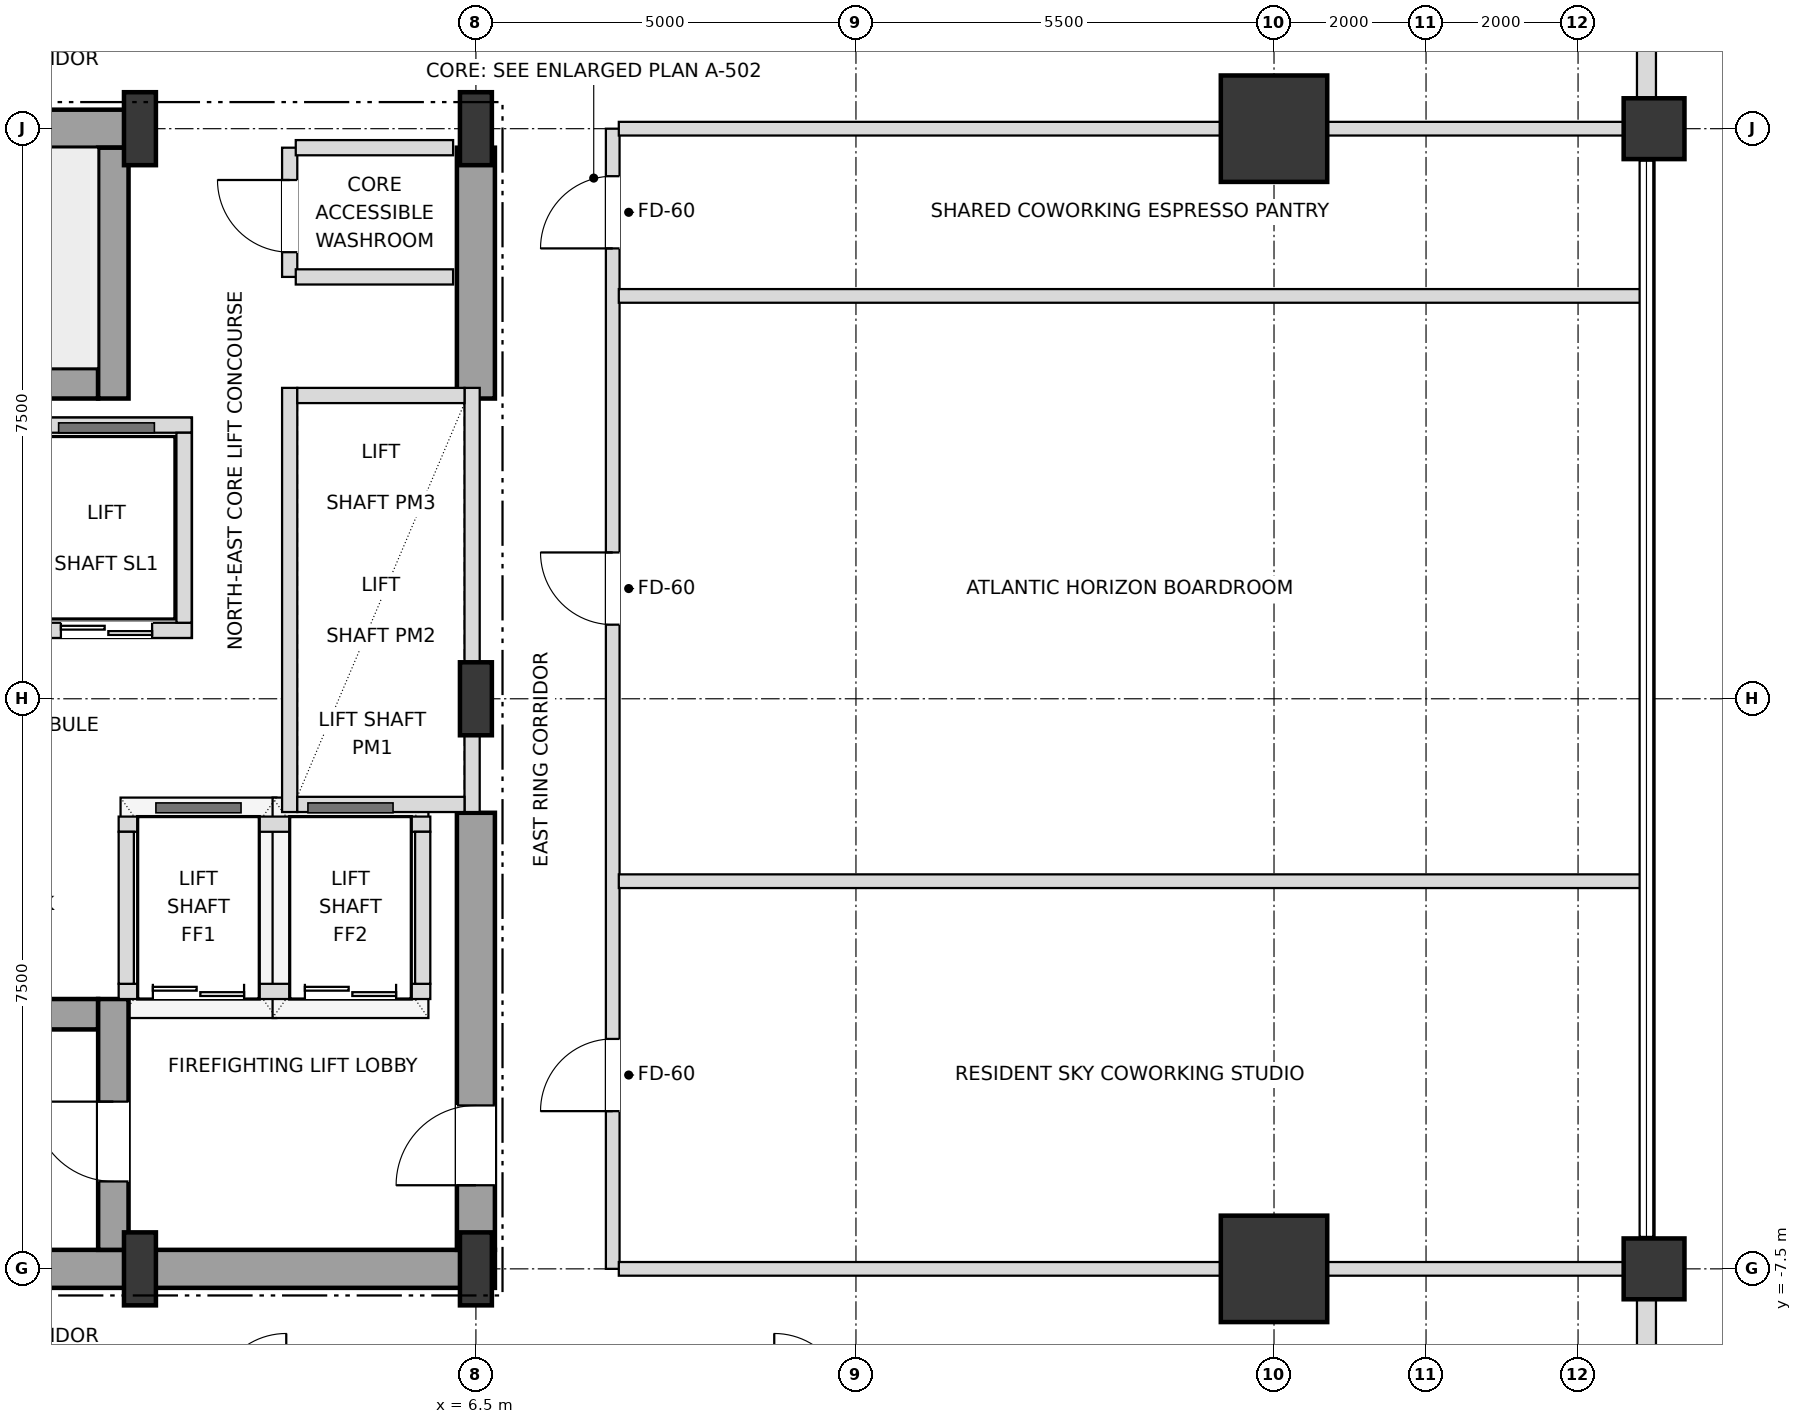
"""IFC4 building model, lengths in metres.
Left out: names, types, materials, properties, quantities, classifications, styles, units other than length and angle.
Written with IfcOpenShell. Run it as: python <this file> out.ifc"""

import sys

from ifc_helpers import new_model, si_unit, direction, frame, frame_2d, origin, origin_2d, place, context, subcontext, project, spatial, rectangle, i_section, extrude, element, fill, save


model = new_model("IFC4")
c1 = context("Model", 3, precision=1e-05, world=origin(), true_north=direction((0.0, 1.0)))
c2 = subcontext(c1, "Body", "Model", "MODEL_VIEW")
j1 = project(units=[si_unit("LENGTHUNIT", "METRE"), si_unit("PLANEANGLEUNIT", "RADIAN")], contexts=[c1])
p1 = place(None, origin())
s1 = spatial("IfcSite", under=j1, at=p1, CompositionType="ELEMENT")
p2 = place(p1, origin())
s2 = spatial("IfcBuilding", under=s1, at=p2, CompositionType="ELEMENT")
p3 = place(p2, frame((0.0, 0.0, 86.4)))
s3 = spatial("IfcBuildingStorey", under=s2, at=p3, CompositionType="ELEMENT", Elevation=86.4)
for number, where, z_axis, x_axis in (
    (1, (2.08, -7.5, 0.0), (0.0, 0.0, 1.0), (1.0, 0.0, 0.0)),
    (2, (6.5, -7.5, 0.0), (0.0, 0.0, 1.0), (1.0, 0.0, 0.0)),
    (3, (6.5, 0.0, 0.0), (0.0, 0.0, 1.0), (1.0, 0.0, 0.0)),
    (4, (2.08, 7.5, 0.0), (0.0, 0.0, 1.0), (1.0, 0.0, 0.0)),
    (5, (6.5, 7.5, 0.0), (0.0, 0.0, 1.0), (1.0, 0.0, 0.0)),
):
    element("IfcColumn", number, at=place(p3, frame(where, z_axis=z_axis, x_axis=x_axis)), inside=s3, PredefinedType="COLUMN", context=c2, shape_type="SweptSolid", body=[
        extrude(i_section(OverallWidth=0.42, OverallDepth=0.96, WebThickness=0.022, FlangeThickness=0.034, at=origin_2d()), origin(), (0.0, 0.0, 1.0), 3.6),
    ])
for number, where, z_axis, x_axis in (
    (6, (17.0, -7.5, 0.0), (0.0, 0.0, 1.0), (1.0, 0.0, 0.0)),
    (7, (17.0, 7.5, 0.0), (0.0, 0.0, 1.0), (1.0, 0.0, 0.0)),
):
    element("IfcColumn", number, at=place(p3, frame(where, z_axis=z_axis, x_axis=x_axis)), inside=s3, PredefinedType="USERDEFINED", context=c2, shape_type="SweptSolid", body=[
        extrude(rectangle(XDim=1.4, YDim=1.4, at=origin_2d()), origin(), (0.0, 0.0, 1.0), 3.6),
    ])
for number, where, z_axis, x_axis in (
    (8, (22.0, -7.5, 0.0), (0.0, 0.0, 1.0), (1.0, 0.0, 0.0)),
    (9, (22.0, 7.5, 0.0), (0.0, 0.0, 1.0), (1.0, 0.0, 0.0)),
):
    element("IfcColumn", number, at=place(p3, frame(where, z_axis=z_axis, x_axis=x_axis)), inside=s3, PredefinedType="COLUMN", context=c2, shape_type="SweptSolid", body=[
        extrude(rectangle(XDim=0.8, YDim=0.8, at=origin_2d()), origin(), (0.0, 0.0, 1.0), 3.6),
    ])
p4 = place(p3, frame((21.9, -12.605, 0.0), z_axis=(0.0, 0.0, 1.0), x_axis=(0.0, 1.0, 0.0)))
e10 = element("IfcWall", 10, at=p4, inside=s3, PredefinedType="SOLIDWALL", context=c2, shape_type="SweptSolid", body=[
    extrude(rectangle(XDim=4.71, YDim=0.25, at=frame_2d((2.355, 0.0))), origin(), (0.0, 0.0, 1.0), 2.736),
])
p5 = place(p4, frame((1.455, 0.0, 0.72)))
e11 = element("IfcOpeningElement", 11, at=p5, cuts=e10, PredefinedType="OPENING", context=c2, shape_type="SweptSolid", body=[
    extrude(rectangle(XDim=1.8, YDim=1.68, at=frame_2d((0.9, 0.84))), frame((0.0, 0.135, 0.0), z_axis=(0.0, -1.0, 0.0), x_axis=(1.0, 0.0, 0.0)), (0.0, 0.0, 1.0), 0.27),
])
p6 = place(p3, frame((21.9, 7.895, 0.0), z_axis=(0.0, 0.0, 1.0), x_axis=(0.0, 1.0, 0.0)))
e12 = element("IfcWall", 12, at=p6, inside=s3, PredefinedType="SOLIDWALL", context=c2, shape_type="SweptSolid", body=[
    extrude(rectangle(XDim=4.71, YDim=0.25, at=frame_2d((2.355, 0.0))), origin(), (0.0, 0.0, 1.0), 2.736),
])
p7 = place(p6, frame((1.455, 0.0, 0.72)))
e13 = element("IfcOpeningElement", 13, at=p7, cuts=e12, PredefinedType="OPENING", context=c2, shape_type="SweptSolid", body=[
    extrude(rectangle(XDim=1.8, YDim=1.68, at=frame_2d((0.9, 0.84))), frame((0.0, 0.135, 0.0), z_axis=(0.0, -1.0, 0.0), x_axis=(1.0, 0.0, 0.0)), (0.0, 0.0, 1.0), 0.27),
])
p8 = place(p3, frame((0.0, -7.5, 0.0), z_axis=(0.0, 0.0, 1.0), x_axis=(1.0, 0.0, 0.0)))
e14 = element("IfcWall", 14, at=p8, inside=s3, PredefinedType="SHEAR", context=c2, shape_type="SweptSolid", body=[
    extrude(rectangle(XDim=6.75, YDim=0.5, at=frame_2d((3.375, 0.0))), origin(), (0.0, 0.0, 1.0), 3.38),
])
p9 = place(p3, frame((0.0, 7.5, 0.0), z_axis=(0.0, 0.0, 1.0), x_axis=(1.0, 0.0, 0.0)))
e15 = element("IfcWall", 15, at=p9, inside=s3, PredefinedType="SHEAR", context=c2, shape_type="SweptSolid", body=[
    extrude(rectangle(XDim=2.08, YDim=0.5, at=frame_2d((1.04, 0.0))), origin(), (0.0, 0.0, 1.0), 3.38),
])
p10 = place(p3, frame((6.5, -7.25, 0.0), z_axis=(0.0, 0.0, 1.0), x_axis=(0.0, 1.0, 0.0)))
e16 = element("IfcWall", 16, at=p10, inside=s3, PredefinedType="SHEAR", context=c2, shape_type="SweptSolid", body=[
    extrude(rectangle(XDim=5.75, YDim=0.5, at=frame_2d((2.875, 0.0))), origin(), (0.0, 0.0, 1.0), 3.38),
])
p11 = place(p10, frame((0.85, 0.0, 0.0)))
e17 = element("IfcOpeningElement", 17, at=p11, cuts=e16, PredefinedType="OPENING", context=c2, shape_type="SweptSolid", body=[
    extrude(rectangle(XDim=1.05, YDim=2.15, at=frame_2d((0.525, 1.075))), frame((0.0, 0.26, 0.0), z_axis=(0.0, -1.0, 0.0), x_axis=(1.0, 0.0, 0.0)), (0.0, 0.0, 1.0), 0.52),
])
p12 = place(p3, frame((6.5, 3.95, 0.0), z_axis=(0.0, 0.0, 1.0), x_axis=(0.0, 1.0, 0.0)))
e18 = element("IfcWall", 18, at=p12, inside=s3, PredefinedType="SHEAR", context=c2, shape_type="SweptSolid", body=[
    extrude(rectangle(XDim=3.3, YDim=0.5, at=frame_2d((1.65, 0.0))), origin(), (0.0, 0.0, 1.0), 3.38),
])
p13 = place(p3, frame((-6.25, -4.15, 0.0), z_axis=(0.0, 0.0, 1.0), x_axis=(1.0, 0.0, 0.0)))
e19 = element("IfcWall", 19, at=p13, inside=s3, PredefinedType="SHEAR", context=c2, shape_type="SweptSolid", body=[
    extrude(rectangle(XDim=7.78, YDim=0.4, at=frame_2d((3.89, 0.0))), origin(), (0.0, 0.0, 1.0), 3.38),
])
p14 = place(p3, frame((1.73, -7.25, 0.0), z_axis=(0.0, 0.0, 1.0), x_axis=(0.0, 1.0, 0.0)))
e20 = element("IfcWall", 20, at=p14, inside=s3, PredefinedType="SHEAR", context=c2, shape_type="SweptSolid", body=[
    extrude(rectangle(XDim=3.3, YDim=0.4, at=frame_2d((1.65, 0.0))), origin(), (0.0, 0.0, 1.0), 3.38),
])
p15 = place(p14, frame((0.9, 0.0, 0.0)))
e21 = element("IfcOpeningElement", 21, at=p15, cuts=e20, PredefinedType="OPENING", context=c2, shape_type="SweptSolid", body=[
    extrude(rectangle(XDim=1.05, YDim=2.15, at=frame_2d((0.525, 1.075))), frame((0.0, 0.21, 0.0), z_axis=(0.0, -1.0, 0.0), x_axis=(1.0, 0.0, 0.0)), (0.0, 0.0, 1.0), 0.42),
])
p16 = place(p3, frame((-5.55, 4.15, 0.0), z_axis=(0.0, 0.0, 1.0), x_axis=(1.0, 0.0, 0.0)))
e22 = element("IfcWall", 22, at=p16, inside=s3, PredefinedType="SHEAR", context=c2, shape_type="SweptSolid", body=[
    extrude(rectangle(XDim=7.08, YDim=0.4, at=frame_2d((3.54, 0.0))), origin(), (0.0, 0.0, 1.0), 3.38),
])
p17 = place(p3, frame((1.73, 3.95, 0.0), z_axis=(0.0, 0.0, 1.0), x_axis=(0.0, 1.0, 0.0)))
e23 = element("IfcWall", 23, at=p17, inside=s3, PredefinedType="SHEAR", context=c2, shape_type="SweptSolid", body=[
    extrude(rectangle(XDim=3.3, YDim=0.4, at=frame_2d((1.65, 0.0))), origin(), (0.0, 0.0, 1.0), 3.38),
])
p18 = place(p3, frame((4.05, -1.49, 0.0), z_axis=(0.0, 0.0, 1.0), x_axis=(0.0, 1.0, 0.0)))
e24 = element("IfcWall", 24, at=p18, inside=s3, PredefinedType="SOLIDWALL", context=c2, shape_type="SweptSolid", body=[
    extrude(rectangle(XDim=5.58, YDim=0.2, at=frame_2d((2.79, 0.0))), origin(), (0.0, 0.0, 1.0), 3.38),
])
p19 = place(p3, frame((6.45, -1.49, 0.0), z_axis=(0.0, 0.0, 1.0), x_axis=(0.0, 1.0, 0.0)))
e25 = element("IfcWall", 25, at=p19, inside=s3, PredefinedType="SOLIDWALL", context=c2, shape_type="SweptSolid", body=[
    extrude(rectangle(XDim=5.58, YDim=0.2, at=frame_2d((2.79, 0.0))), origin(), (0.0, 0.0, 1.0), 2.816),
])
for number, where, z_axis, x_axis in (
    (26, (4.15, -1.39, 0.0), (0.0, 0.0, 1.0), (1.0, 0.0, 0.0)),
    (27, (4.15, 3.99, 0.0), (0.0, 0.0, 1.0), (1.0, 0.0, 0.0)),
):
    element("IfcWall", number, at=place(p3, frame(where, z_axis=z_axis, x_axis=x_axis)), inside=s3, PredefinedType="SOLIDWALL", context=c2, shape_type="SweptSolid", body=[
        extrude(rectangle(XDim=2.2, YDim=0.2, at=frame_2d((1.1, 0.0))), origin(), (0.0, 0.0, 1.0), 3.38),
    ])
p20 = place(p3, frame((-2.82, 0.9, 0.0), z_axis=(0.0, 0.0, 1.0), x_axis=(1.0, 0.0, 0.0)))
e28 = element("IfcWall", 28, at=p20, inside=s3, PredefinedType="SOLIDWALL", context=c2, shape_type="SweptSolid", body=[
    extrude(rectangle(XDim=5.58, YDim=0.2, at=frame_2d((2.79, 0.0))), origin(), (0.0, 0.0, 1.0), 3.38),
])
p21 = place(p20, frame((3.86, 0.0, 0.0)))
e29 = element("IfcOpeningElement", 29, at=p21, cuts=e28, PredefinedType="OPENING", context=c2, shape_type="SweptSolid", body=[
    extrude(rectangle(XDim=1.2, YDim=2.2, at=frame_2d((0.6, 1.1))), frame((0.0, 0.11, 0.0), z_axis=(0.0, -1.0, 0.0), x_axis=(1.0, 0.0, 0.0)), (0.0, 0.0, 1.0), 0.22),
])
p22 = place(p3, frame((-2.82, 3.6, 0.0), z_axis=(0.0, 0.0, 1.0), x_axis=(1.0, 0.0, 0.0)))
e30 = element("IfcWall", 30, at=p22, inside=s3, PredefinedType="SOLIDWALL", context=c2, shape_type="SweptSolid", body=[
    extrude(rectangle(XDim=5.58, YDim=0.2, at=frame_2d((2.79, 0.0))), origin(), (0.0, 0.0, 1.0), 3.38),
])
p23 = place(p3, frame((2.66, 1.0, 0.0), z_axis=(0.0, 0.0, 1.0), x_axis=(0.0, 1.0, 0.0)))
e31 = element("IfcWall", 31, at=p23, inside=s3, PredefinedType="SOLIDWALL", context=c2, shape_type="SweptSolid", body=[
    extrude(rectangle(XDim=2.5, YDim=0.2, at=frame_2d((1.25, 0.0))), origin(), (0.0, 0.0, 1.0), 3.38),
])
p24 = place(p3, frame((1.8, -3.85, 0.0), z_axis=(0.0, 0.0, 1.0), x_axis=(1.0, 0.0, 0.0)))
e32 = element("IfcWall", 32, at=p24, inside=s3, PredefinedType="SOLIDWALL", context=c2, shape_type="SweptSolid", body=[
    extrude(rectangle(XDim=4.1, YDim=0.2, at=frame_2d((2.05, 0.0))), origin(), (0.0, 0.0, 1.0), 3.38),
])
p25 = place(p24, frame((0.45, 0.0, 0.0)))
e33 = element("IfcOpeningElement", 33, at=p25, cuts=e32, PredefinedType="OPENING", context=c2, shape_type="SweptSolid", body=[
    extrude(rectangle(XDim=1.2, YDim=2.2, at=frame_2d((0.6, 1.1))), frame((0.0, 0.11, 0.0), z_axis=(0.0, -1.0, 0.0), x_axis=(1.0, 0.0, 0.0)), (0.0, 0.0, 1.0), 0.22),
])
p26 = place(p24, frame((2.45, 0.0, 0.0)))
e34 = element("IfcOpeningElement", 34, at=p26, cuts=e32, PredefinedType="OPENING", context=c2, shape_type="SweptSolid", body=[
    extrude(rectangle(XDim=1.2, YDim=2.2, at=frame_2d((0.6, 1.1))), frame((0.0, 0.11, 0.0), z_axis=(0.0, -1.0, 0.0), x_axis=(1.0, 0.0, 0.0)), (0.0, 0.0, 1.0), 0.22),
])
p27 = place(p3, frame((1.8, -1.65, 0.0), z_axis=(0.0, 0.0, 1.0), x_axis=(1.0, 0.0, 0.0)))
e35 = element("IfcWall", 35, at=p27, inside=s3, PredefinedType="SOLIDWALL", context=c2, shape_type="SweptSolid", body=[
    extrude(rectangle(XDim=4.1, YDim=0.2, at=frame_2d((2.05, 0.0))), origin(), (0.0, 0.0, 1.0), 3.38),
])
for number, where, z_axis, x_axis in (
    (36, (1.9, -3.75, 0.0), (0.0, 0.0, 1.0), (0.0, 1.0, 0.0)),
    (37, (5.8, -3.75, 0.0), (0.0, 0.0, 1.0), (0.0, 1.0, 0.0)),
):
    element("IfcWall", number, at=place(p3, frame(where, z_axis=z_axis, x_axis=x_axis)), inside=s3, PredefinedType="SOLIDWALL", context=c2, shape_type="SweptSolid", body=[
        extrude(rectangle(XDim=2.0, YDim=0.2, at=frame_2d((1.0, 0.0))), origin(), (0.0, 0.0, 1.0), 3.38),
    ])
p28 = place(p3, frame((4.05, 5.55, 0.0), z_axis=(0.0, 0.0, 1.0), x_axis=(0.0, 1.0, 0.0)))
e38 = element("IfcWall", 38, at=p28, inside=s3, PredefinedType="SOLIDWALL", context=c2, shape_type="SweptSolid", body=[
    extrude(rectangle(XDim=1.7, YDim=0.2, at=frame_2d((0.85, 0.0))), origin(), (0.0, 0.0, 1.0), 3.38),
])
p29 = place(p28, frame((0.325, 0.0, 0.0)))
e39 = element("IfcOpeningElement", 39, at=p29, cuts=e38, PredefinedType="OPENING", context=c2, shape_type="SweptSolid", body=[
    extrude(rectangle(XDim=0.95, YDim=2.15, at=frame_2d((0.475, 1.075))), frame((0.0, 0.11, 0.0), z_axis=(0.0, -1.0, 0.0), x_axis=(1.0, 0.0, 0.0)), (0.0, 0.0, 1.0), 0.22),
])
p30 = place(p3, frame((8.3, -7.5, 0.0), z_axis=(0.0, 0.0, 1.0), x_axis=(0.0, 1.0, 0.0)))
e40 = element("IfcWall", 40, at=p30, inside=s3, PredefinedType="PARTITIONING", context=c2, shape_type="SweptSolid", body=[
    extrude(rectangle(XDim=15.0, YDim=0.18, at=frame_2d((7.5, 0.0))), origin(), (0.0, 0.0, 1.0), 3.38),
])
p31 = place(p30, frame((2.075, 0.0, 0.0)))
e41 = element("IfcOpeningElement", 41, at=p31, cuts=e40, PredefinedType="OPENING", context=c2, shape_type="SweptSolid", body=[
    extrude(rectangle(XDim=0.95, YDim=2.15, at=frame_2d((0.475, 1.075))), frame((0.0, 0.1, 0.0), z_axis=(0.0, -1.0, 0.0), x_axis=(1.0, 0.0, 0.0)), (0.0, 0.0, 1.0), 0.2),
])
p32 = place(p30, frame((8.475, 0.0, 0.0)))
e42 = element("IfcOpeningElement", 42, at=p32, cuts=e40, PredefinedType="OPENING", context=c2, shape_type="SweptSolid", body=[
    extrude(rectangle(XDim=0.95, YDim=2.15, at=frame_2d((0.475, 1.075))), frame((0.0, 0.1, 0.0), z_axis=(0.0, -1.0, 0.0), x_axis=(1.0, 0.0, 0.0)), (0.0, 0.0, 1.0), 0.2),
])
p33 = place(p30, frame((13.425, 0.0, 0.0)))
e43 = element("IfcOpeningElement", 43, at=p33, cuts=e40, PredefinedType="OPENING", context=c2, shape_type="SweptSolid", body=[
    extrude(rectangle(XDim=0.95, YDim=2.15, at=frame_2d((0.475, 1.075))), frame((0.0, 0.1, 0.0), z_axis=(0.0, -1.0, 0.0), x_axis=(1.0, 0.0, 0.0)), (0.0, 0.0, 1.0), 0.2),
])
p34 = place(p3, frame((8.38, -7.5, 0.0), z_axis=(0.0, 0.0, 1.0), x_axis=(1.0, 0.0, 0.0)))
e44 = element("IfcWall", 44, at=p34, inside=s3, PredefinedType="PARTITIONING", context=c2, shape_type="SweptSolid", body=[
    extrude(rectangle(XDim=13.52, YDim=0.18, at=frame_2d((6.76, 0.0))), origin(), (0.0, 0.0, 1.0), 2.816),
])
for number, where, z_axis, x_axis in (
    (45, (8.38, -2.4, 0.0), (0.0, 0.0, 1.0), (1.0, 0.0, 0.0)),
    (46, (8.38, 5.3, 0.0), (0.0, 0.0, 1.0), (1.0, 0.0, 0.0)),
):
    element("IfcWall", number, at=place(p3, frame(where, z_axis=z_axis, x_axis=x_axis)), inside=s3, PredefinedType="PARTITIONING", context=c2, shape_type="SweptSolid", body=[
        extrude(rectangle(XDim=13.44, YDim=0.18, at=frame_2d((6.72, 0.0))), origin(), (0.0, 0.0, 1.0), 2.816),
    ])
for number, where, z_axis, x_axis in (
    (47, (4.13, 5.55, 0.0), (0.0, 0.0, 1.0), (1.0, 0.0, 0.0)),
    (48, (4.13, 7.25, 0.0), (0.0, 0.0, 1.0), (1.0, 0.0, 0.0)),
):
    element("IfcWall", number, at=place(p3, frame(where, z_axis=z_axis, x_axis=x_axis)), inside=s3, PredefinedType="SOLIDWALL", context=c2, shape_type="SweptSolid", body=[
        extrude(rectangle(XDim=2.07, YDim=0.2, at=frame_2d((1.035, 0.0))), origin(), (0.0, 0.0, 1.0), 3.38),
    ])
p35 = place(p3, frame((8.38, 7.5, 0.0), z_axis=(0.0, 0.0, 1.0), x_axis=(1.0, 0.0, 0.0)))
e49 = element("IfcWall", 49, at=p35, inside=s3, PredefinedType="PARTITIONING", context=c2, shape_type="SweptSolid", body=[
    extrude(rectangle(XDim=13.52, YDim=0.18, at=frame_2d((6.76, 0.0))), origin(), (0.0, 0.0, 1.0), 2.816),
])
p36 = place(p11, origin())
e50 = element("IfcDoor", 50, at=p36, inside=s3, OperationType="SINGLE_SWING_LEFT", PredefinedType="DOOR", context=c2, shape_type="SweptSolid", body=[
    extrude(rectangle(XDim=1.05, YDim=2.15, at=frame_2d((0.525, 1.075))), frame((0.0, 0.025, 0.0), z_axis=(0.0, -1.0, 0.0), x_axis=(1.0, 0.0, 0.0)), (0.0, 0.0, 1.0), 0.05),
])
fill(e17, e50)
p37 = place(p15, origin())
e51 = element("IfcDoor", 51, at=p37, inside=s3, OperationType="SINGLE_SWING_RIGHT", PredefinedType="DOOR", context=c2, shape_type="SweptSolid", body=[
    extrude(rectangle(XDim=1.05, YDim=2.15, at=frame_2d((0.525, 1.075))), frame((0.0, 0.025, 0.0), z_axis=(0.0, -1.0, 0.0), x_axis=(1.0, 0.0, 0.0)), (0.0, 0.0, 1.0), 0.05),
])
fill(e21, e51)
p38 = place(p21, origin())
e52 = element("IfcDoor", 52, at=p38, inside=s3, OperationType="DOUBLE_DOOR_SLIDING", PredefinedType="DOOR", context=c2, shape_type="SweptSolid", body=[
    extrude(rectangle(XDim=1.2, YDim=2.2, at=frame_2d((0.6, 1.1))), frame((0.0, 0.025, 0.0), z_axis=(0.0, -1.0, 0.0), x_axis=(1.0, 0.0, 0.0)), (0.0, 0.0, 1.0), 0.05),
])
fill(e29, e52)
p39 = place(p25, origin())
e53 = element("IfcDoor", 53, at=p39, inside=s3, OperationType="DOUBLE_DOOR_SLIDING", PredefinedType="DOOR", context=c2, shape_type="SweptSolid", body=[
    extrude(rectangle(XDim=1.2, YDim=2.2, at=frame_2d((0.6, 1.1))), frame((0.0, 0.025, 0.0), z_axis=(0.0, -1.0, 0.0), x_axis=(1.0, 0.0, 0.0)), (0.0, 0.0, 1.0), 0.05),
])
fill(e33, e53)
p40 = place(p26, origin())
e54 = element("IfcDoor", 54, at=p40, inside=s3, OperationType="DOUBLE_DOOR_SLIDING", PredefinedType="DOOR", context=c2, shape_type="SweptSolid", body=[
    extrude(rectangle(XDim=1.2, YDim=2.2, at=frame_2d((0.6, 1.1))), frame((0.0, 0.025, 0.0), z_axis=(0.0, -1.0, 0.0), x_axis=(1.0, 0.0, 0.0)), (0.0, 0.0, 1.0), 0.05),
])
fill(e34, e54)
p41 = place(p29, origin())
e55 = element("IfcDoor", 55, at=p41, inside=s3, OperationType="SINGLE_SWING_RIGHT", PredefinedType="DOOR", context=c2, shape_type="SweptSolid", body=[
    extrude(rectangle(XDim=0.95, YDim=2.15, at=frame_2d((0.475, 1.075))), frame((0.0, 0.025, 0.0), z_axis=(0.0, -1.0, 0.0), x_axis=(1.0, 0.0, 0.0)), (0.0, 0.0, 1.0), 0.05),
])
fill(e39, e55)
p42 = place(p31, origin())
e56 = element("IfcDoor", 56, at=p42, inside=s3, OperationType="SINGLE_SWING_LEFT", PredefinedType="DOOR", context=c2, shape_type="SweptSolid", body=[
    extrude(rectangle(XDim=0.95, YDim=2.15, at=frame_2d((0.475, 1.075))), frame((0.0, 0.025, 0.0), z_axis=(0.0, -1.0, 0.0), x_axis=(1.0, 0.0, 0.0)), (0.0, 0.0, 1.0), 0.05),
])
fill(e41, e56)
p43 = place(p32, origin())
e57 = element("IfcDoor", 57, at=p43, inside=s3, OperationType="SINGLE_SWING_RIGHT", PredefinedType="DOOR", context=c2, shape_type="SweptSolid", body=[
    extrude(rectangle(XDim=0.95, YDim=2.15, at=frame_2d((0.475, 1.075))), frame((0.0, 0.025, 0.0), z_axis=(0.0, -1.0, 0.0), x_axis=(1.0, 0.0, 0.0)), (0.0, 0.0, 1.0), 0.05),
])
fill(e42, e57)
p44 = place(p33, origin())
e58 = element("IfcDoor", 58, at=p44, inside=s3, OperationType="SINGLE_SWING_LEFT", PredefinedType="DOOR", context=c2, shape_type="SweptSolid", body=[
    extrude(rectangle(XDim=0.95, YDim=2.15, at=frame_2d((0.475, 1.075))), frame((0.0, 0.025, 0.0), z_axis=(0.0, -1.0, 0.0), x_axis=(1.0, 0.0, 0.0)), (0.0, 0.0, 1.0), 0.05),
])
fill(e43, e58)
save(model, sys.argv[1])
